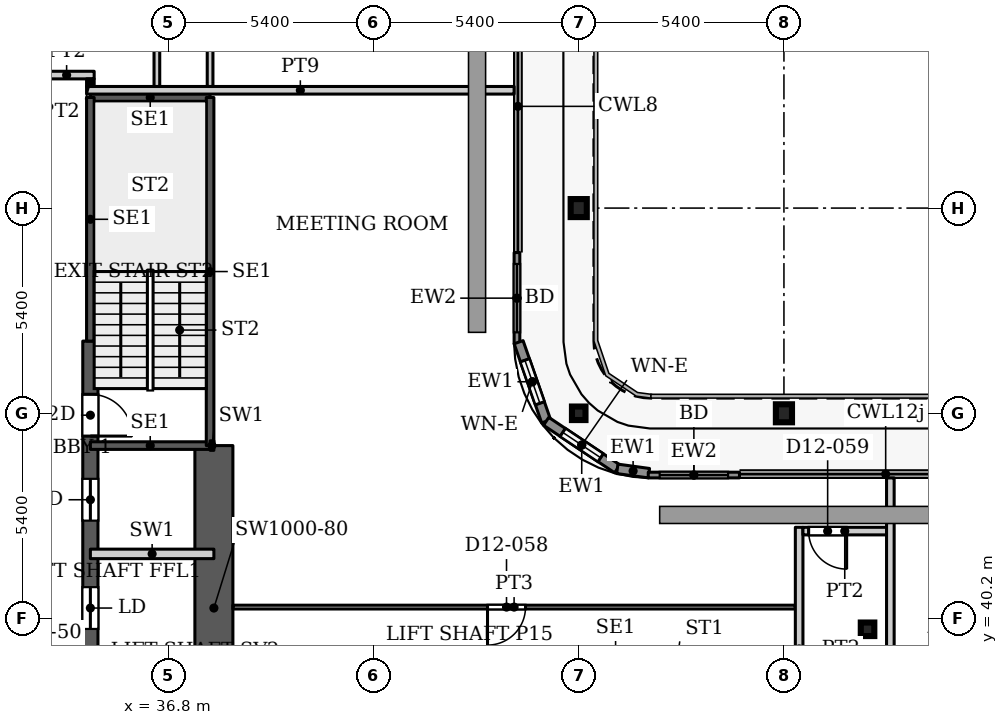
"""IFC4 building model, lengths in metres.
Left out: names, types, materials, properties, quantities, classifications, styles, units other than length and angle.
Written with IfcOpenShell. Run it as: python <this file> out.ifc"""

import sys

from ifc_helpers import new_model, si_unit, direction, frame, frame_2d, origin, origin_2d, place, context, subcontext, project, spatial, rectangle, hollow_rectangle, i_section, extrude, source, transform, mapped, element, fill, save


model = new_model("IFC4")
c1 = context("Model", 3, precision=1e-05, world=origin(), true_north=direction((0.0, 1.0)))
c2 = subcontext(c1, "Body", "Model", "MODEL_VIEW")
j1 = project(units=[si_unit("LENGTHUNIT", "METRE"), si_unit("PLANEANGLEUNIT", "RADIAN")], contexts=[c1])
p1 = place(None, origin())
s1 = spatial("IfcSite", under=j1, at=p1, CompositionType="ELEMENT")
p2 = place(p1, origin())
s2 = spatial("IfcBuilding", under=s1, at=p2, CompositionType="ELEMENT")
p3 = place(p2, frame((0.0, 0.0, 57.8)))
s3 = spatial("IfcBuildingStorey", under=s2, at=p3, CompositionType="ELEMENT", Elevation=57.8)
for number, where, z_axis, x_axis in (
    (1, (53.0, 45.6, 0.0), (0.0, 0.0, 1.0), (1.0, 0.0, 0.0)),
    (2, (47.6, 51.0, 0.0), (0.0, 0.0, 1.0), (1.0, 0.0, 0.0)),
):
    element("IfcColumn", number, at=place(p3, frame(where, z_axis=z_axis, x_axis=x_axis)), inside=s3, PredefinedType="COLUMN", context=c2, shape_type="SweptSolid", body=[
        extrude(i_section(OverallWidth=0.424, OverallDepth=0.474, WebThickness=0.048, FlangeThickness=0.077, FilletRadius=0.014, at=origin_2d()), origin(), (0.0, 0.0, 1.0), 3.9),
    ])
for number, where, z_axis, x_axis in (
    (3, (55.2, 39.916, 0.0), (0.0, 0.0, 1.0), (1.0, 0.0, 0.0)),
    (4, (47.6, 45.6, 0.0), (0.0, 0.0, 1.0), (1.0, 0.0, 0.0)),
):
    element("IfcColumn", number, at=place(p3, frame(where, z_axis=z_axis, x_axis=x_axis)), inside=s3, PredefinedType="COLUMN", context=c2, shape_type="SweptSolid", body=[
        extrude(hollow_rectangle(XDim=0.356, YDim=0.356, WallThickness=0.016, InnerFilletRadius=0.016, OuterFilletRadius=0.032, at=origin_2d()), origin(), (0.0, 0.0, 1.0), 3.9),
    ])
p4 = place(p3, frame((34.75, 29.05, 0.0), z_axis=(0.0, 0.0, 1.0), x_axis=(0.0, 1.0, 0.0)))
e5 = element("IfcWall", 5, at=p4, inside=s3, PredefinedType="SHEAR", context=c2, shape_type="SweptSolid", body=[
    extrude(rectangle(XDim=18.45, YDim=0.4, at=frame_2d((9.225, 0.0))), origin(), (0.0, 0.0, 1.0), 3.9),
])
p5 = place(p4, frame((8.025, 0.0, 0.0)))
e6 = element("IfcOpeningElement", 6, at=p5, cuts=e5, PredefinedType="OPENING", context=c2, shape_type="SweptSolid", body=[
    extrude(rectangle(XDim=1.1, YDim=2.2, at=frame_2d((0.55, 1.1))), frame((0.0, 0.21, 0.0), z_axis=(0.0, -1.0, 0.0), x_axis=(1.0, 0.0, 0.0)), (0.0, 0.0, 1.0), 0.42),
])
p6 = place(p4, frame((10.875, 0.0, 0.0)))
e7 = element("IfcOpeningElement", 7, at=p6, cuts=e5, PredefinedType="OPENING", context=c2, shape_type="SweptSolid", body=[
    extrude(rectangle(XDim=1.1, YDim=2.2, at=frame_2d((0.55, 1.1))), frame((0.0, 0.21, 0.0), z_axis=(0.0, -1.0, 0.0), x_axis=(1.0, 0.0, 0.0)), (0.0, 0.0, 1.0), 0.42),
])
p7 = place(p4, frame((13.725, 0.0, 0.0)))
e8 = element("IfcOpeningElement", 8, at=p7, cuts=e5, PredefinedType="OPENING", context=c2, shape_type="SweptSolid", body=[
    extrude(rectangle(XDim=1.1, YDim=2.2, at=frame_2d((0.55, 1.1))), frame((0.0, 0.21, 0.0), z_axis=(0.0, -1.0, 0.0), x_axis=(1.0, 0.0, 0.0)), (0.0, 0.0, 1.0), 0.42),
])
p8 = place(p4, frame((15.95, 0.0, 0.0)))
e9 = element("IfcOpeningElement", 9, at=p8, cuts=e5, PredefinedType="OPENING", context=c2, shape_type="SweptSolid", body=[
    extrude(rectangle(XDim=1.1, YDim=2.2, at=frame_2d((0.55, 1.1))), frame((0.0, 0.21, 0.0), z_axis=(0.0, -1.0, 0.0), x_axis=(1.0, 0.0, 0.0)), (0.0, 0.0, 1.0), 0.42),
])
p9 = place(p3, frame((38.0, 36.2, 0.0), z_axis=(0.0, 0.0, 1.0), x_axis=(0.0, 1.0, 0.0)))
e10 = element("IfcWall", 10, at=p9, inside=s3, PredefinedType="SHEAR", context=c2, shape_type="SweptSolid", body=[
    extrude(rectangle(XDim=8.55, YDim=1.0, at=frame_2d((4.275, 0.0))), origin(), (0.0, 0.0, 1.0), 3.9),
])
p10 = place(p3, frame((45.975, 49.83, 0.0), z_axis=(0.0, 0.0, 1.0), x_axis=(0.0, -1.0, 0.0)))
e11 = element("IfcWall", 11, at=p10, inside=s3, PredefinedType="SOLIDWALL", context=c2, shape_type="SweptSolid", body=[
    extrude(rectangle(XDim=2.4, YDim=0.15, at=frame_2d((1.2, 0.0))), origin(), (0.0, 0.0, 1.0), 3.75),
])
p11 = place(p10, frame((0.3, 0.0, 0.0)))
e12 = element("IfcOpeningElement", 12, at=p11, cuts=e11, PredefinedType="OPENING", context=c2, shape_type="SweptSolid", body=[
    extrude(rectangle(XDim=1.8, YDim=2.4, at=frame_2d((0.9, 1.2))), frame((0.0, 0.085, 0.0), z_axis=(0.0, -1.0, 0.0), x_axis=(1.0, 0.0, 0.0)), (0.0, 0.0, 1.0), 0.17),
])
p12 = place(p3, frame((46.018, 47.471, 0.0), z_axis=(0.0, 0.0, 1.0), x_axis=(0.328791208903, -0.944402637093, 0.0)))
e13 = element("IfcWall", 13, at=p12, inside=s3, PredefinedType="SOLIDWALL", context=c2, shape_type="SweptSolid", body=[
    extrude(rectangle(XDim=2.205, YDim=0.25, at=frame_2d((1.102, 0.0))), origin(), (0.0, 0.0, 1.0), 3.75),
])
p13 = place(p12, frame((0.503, 0.0, 0.6)))
e14 = element("IfcOpeningElement", 14, at=p13, cuts=e13, PredefinedType="OPENING", context=c2, shape_type="SweptSolid", body=[
    extrude(rectangle(XDim=1.2, YDim=2.1, at=frame_2d((0.6, 1.05))), frame((0.0, 0.135, 0.0), z_axis=(0.0, -1.0, 0.0), x_axis=(1.0, 0.0, 0.0)), (0.0, 0.0, 1.0), 0.27),
])
p14 = place(p3, frame((46.743, 45.389, 0.0), z_axis=(0.0, 0.0, 1.0), x_axis=(0.831449265529, -0.555600682912, 0.0)))
e15 = element("IfcWall", 15, at=p14, inside=s3, PredefinedType="SOLIDWALL", context=c2, shape_type="SweptSolid", body=[
    extrude(rectangle(XDim=2.251, YDim=0.25, at=frame_2d((1.126, 0.0))), origin(), (0.0, 0.0, 1.0), 3.75),
])
p15 = place(p14, frame((0.525, 0.0, 0.6)))
e16 = element("IfcOpeningElement", 16, at=p15, cuts=e15, PredefinedType="OPENING", context=c2, shape_type="SweptSolid", body=[
    extrude(rectangle(XDim=1.2, YDim=2.1, at=frame_2d((0.6, 1.05))), frame((0.0, 0.135, 0.0), z_axis=(0.0, -1.0, 0.0), x_axis=(1.0, 0.0, 0.0)), (0.0, 0.0, 1.0), 0.27),
])
p16 = place(p3, frame((48.615, 44.138, 0.0), z_axis=(0.0, 0.0, 1.0), x_axis=(0.990741504246, -0.135761819977, 0.0)))
e17 = element("IfcWall", 17, at=p16, inside=s3, PredefinedType="SOLIDWALL", context=c2, shape_type="SweptSolid", body=[
    extrude(rectangle(XDim=0.84, YDim=0.25, at=frame_2d((0.42, 0.0))), origin(), (0.0, 0.0, 1.0), 3.75),
])
p17 = place(p3, frame((49.43, 43.975, 0.0), z_axis=(0.0, 0.0, 1.0), x_axis=(1.0, 0.0, 0.0)))
e18 = element("IfcWall", 18, at=p17, inside=s3, PredefinedType="SOLIDWALL", context=c2, shape_type="SweptSolid", body=[
    extrude(rectangle(XDim=2.4, YDim=0.15, at=frame_2d((1.2, 0.0))), origin(), (0.0, 0.0, 1.0), 3.75),
])
p18 = place(p17, frame((0.3, 0.0, 0.0)))
e19 = element("IfcOpeningElement", 19, at=p18, cuts=e18, PredefinedType="OPENING", context=c2, shape_type="SweptSolid", body=[
    extrude(rectangle(XDim=1.8, YDim=2.4, at=frame_2d((0.9, 1.2))), frame((0.0, 0.085, 0.0), z_axis=(0.0, -1.0, 0.0), x_axis=(1.0, 0.0, 0.0)), (0.0, 0.0, 1.0), 0.17),
])
for number, where, z_axis, x_axis in (
    (20, (34.75, 44.75, 0.0), (0.0, 0.0, 1.0), (1.0, 0.0, 0.0)),
    (21, (34.75, 53.91, 0.0), (0.0, 0.0, 1.0), (1.0, 0.0, 0.0)),
):
    element("IfcWall", number, at=place(p3, frame(where, z_axis=z_axis, x_axis=x_axis)), inside=s3, PredefinedType="SHEAR", context=c2, shape_type="SweptSolid", body=[
        extrude(rectangle(XDim=3.15, YDim=0.2, at=frame_2d((1.575, 0.0))), origin(), (0.0, 0.0, 1.0), 3.9),
    ])
p19 = place(p3, frame((34.75, 47.5, 0.0), z_axis=(0.0, 0.0, 1.0), x_axis=(0.0, 1.0, 0.0)))
e22 = element("IfcWall", 22, at=p19, inside=s3, PredefinedType="SHEAR", context=c2, shape_type="SweptSolid", body=[
    extrude(rectangle(XDim=6.41, YDim=0.2, at=frame_2d((3.205, 0.0))), origin(), (0.0, 0.0, 1.0), 3.9),
])
p20 = place(p3, frame((37.9, 44.75, 0.0), z_axis=(0.0, 0.0, 1.0), x_axis=(0.0, 1.0, 0.0)))
e23 = element("IfcWall", 23, at=p20, inside=s3, PredefinedType="SHEAR", context=c2, shape_type="SweptSolid", body=[
    extrude(rectangle(XDim=9.16, YDim=0.2, at=frame_2d((4.58, 0.0))), origin(), (0.0, 0.0, 1.0), 3.9),
])
p21 = place(p3, frame((34.75, 41.9, 0.0), z_axis=(0.0, 0.0, 1.0), x_axis=(1.0, 0.0, 0.0)))
e24 = element("IfcWall", 24, at=p21, inside=s3, PredefinedType="PARTITIONING", context=c2, shape_type="SweptSolid", body=[
    extrude(rectangle(XDim=3.25, YDim=0.25, at=frame_2d((1.625, 0.0))), origin(), (0.0, 0.0, 1.0), 3.9),
])
p22 = place(p3, frame((37.9, 44.75, 0.0), z_axis=(0.0, 0.0, 1.0), x_axis=(1.0, 0.0, 0.0)))
e25 = element("IfcWall", 25, at=p22, inside=s3, PredefinedType="PARTITIONING", context=c2, shape_type="SweptSolid", body=[
    extrude(rectangle(XDim=0.1, YDim=0.25, at=frame_2d((0.05, 0.0))), origin(), (0.0, 0.0, 1.0), 3.9),
])
p23 = place(p3, frame((33.4, 54.5, 0.0), z_axis=(0.0, 0.0, 1.0), x_axis=(1.0, 0.0, 0.0)))
e26 = element("IfcWall", 26, at=p23, inside=s3, PredefinedType="PARTITIONING", context=c2, shape_type="SweptSolid", body=[
    extrude(rectangle(XDim=1.45, YDim=0.2, at=frame_2d((0.725, 0.0))), origin(), (0.0, 0.0, 1.0), 3.6),
])
p24 = place(p3, frame((34.65, 54.1, 0.0), z_axis=(0.0, 0.0, 1.0), x_axis=(1.0, 0.0, 0.0)))
e27 = element("IfcWall", 27, at=p24, inside=s3, PredefinedType="PARTITIONING", context=c2, shape_type="SweptSolid", body=[
    extrude(rectangle(XDim=11.25, YDim=0.2, at=frame_2d((5.625, 0.0))), origin(), (0.0, 0.0, 1.0), 3.6),
])
p25 = place(p3, frame((34.75, 54.2, 0.0), z_axis=(0.0, 0.0, 1.0), x_axis=(0.0, 1.0, 0.0)))
e28 = element("IfcWall", 28, at=p25, inside=s3, PredefinedType="PARTITIONING", context=c2, shape_type="SweptSolid", body=[
    extrude(rectangle(XDim=0.2, YDim=0.2, at=frame_2d((0.1, 0.0))), origin(), (0.0, 0.0, 1.0), 3.6),
])
p26 = place(p3, frame((36.5, 54.2, 0.0), z_axis=(0.0, 0.0, 1.0), x_axis=(0.0, 1.0, 0.0)))
e29 = element("IfcWall", 29, at=p26, inside=s3, PredefinedType="PARTITIONING", context=c2, shape_type="SweptSolid", body=[
    extrude(rectangle(XDim=10.175, YDim=0.15, at=frame_2d((5.087, 0.0))), origin(), (0.0, 0.0, 1.0), 3.6),
])
p27 = place(p26, frame((5.8, 0.0, 0.0)))
e30 = element("IfcOpeningElement", 30, at=p27, cuts=e29, PredefinedType="OPENING", context=c2, shape_type="SweptSolid", body=[
    extrude(rectangle(XDim=0.8, YDim=2.1, at=frame_2d((0.4, 1.05))), frame((0.0, 0.085, 0.0), z_axis=(0.0, -1.0, 0.0), x_axis=(1.0, 0.0, 0.0)), (0.0, 0.0, 1.0), 0.17),
])
p28 = place(p26, frame((1.45, 0.0, 0.0)))
e31 = element("IfcOpeningElement", 31, at=p28, cuts=e29, PredefinedType="OPENING", context=c2, shape_type="SweptSolid", body=[
    extrude(rectangle(XDim=0.9, YDim=2.1, at=frame_2d((0.45, 1.05))), frame((0.0, 0.085, 0.0), z_axis=(0.0, -1.0, 0.0), x_axis=(1.0, 0.0, 0.0)), (0.0, 0.0, 1.0), 0.17),
])
p29 = place(p26, frame((8.5, 0.0, 0.0)))
e32 = element("IfcOpeningElement", 32, at=p29, cuts=e29, PredefinedType="OPENING", context=c2, shape_type="SweptSolid", body=[
    extrude(rectangle(XDim=0.8, YDim=2.1, at=frame_2d((0.4, 1.05))), frame((0.0, 0.085, 0.0), z_axis=(0.0, -1.0, 0.0), x_axis=(1.0, 0.0, 0.0)), (0.0, 0.0, 1.0), 0.17),
])
p30 = place(p3, frame((37.9, 54.2, 0.0), z_axis=(0.0, 0.0, 1.0), x_axis=(0.0, 1.0, 0.0)))
e33 = element("IfcWall", 33, at=p30, inside=s3, PredefinedType="PARTITIONING", context=c2, shape_type="SweptSolid", body=[
    extrude(rectangle(XDim=13.3, YDim=0.15, at=frame_2d((6.65, 0.0))), origin(), (0.0, 0.0, 1.0), 3.6),
])
p31 = place(p30, frame((1.25, 0.0, 0.0)))
e34 = element("IfcOpeningElement", 34, at=p31, cuts=e33, PredefinedType="OPENING", context=c2, shape_type="SweptSolid", body=[
    extrude(rectangle(XDim=0.9, YDim=2.1, at=frame_2d((0.45, 1.05))), frame((0.0, 0.085, 0.0), z_axis=(0.0, -1.0, 0.0), x_axis=(1.0, 0.0, 0.0)), (0.0, 0.0, 1.0), 0.17),
])
p32 = place(p30, frame((10.2, 0.0, 0.0)))
e35 = element("IfcOpeningElement", 35, at=p32, cuts=e33, PredefinedType="OPENING", context=c2, shape_type="SweptSolid", body=[
    extrude(rectangle(XDim=1.0, YDim=2.1, at=frame_2d((0.5, 1.05))), frame((0.0, 0.085, 0.0), z_axis=(0.0, -1.0, 0.0), x_axis=(1.0, 0.0, 0.0)), (0.0, 0.0, 1.0), 0.17),
])
p33 = place(p30, frame((4.25, 0.0, 0.0)))
e36 = element("IfcOpeningElement", 36, at=p33, cuts=e33, PredefinedType="OPENING", context=c2, shape_type="SweptSolid", body=[
    extrude(rectangle(XDim=0.9, YDim=2.1, at=frame_2d((0.45, 1.05))), frame((0.0, 0.085, 0.0), z_axis=(0.0, -1.0, 0.0), x_axis=(1.0, 0.0, 0.0)), (0.0, 0.0, 1.0), 0.17),
])
p34 = place(p3, frame((38.499, 40.5, 0.0), z_axis=(0.0, 0.0, 1.0), x_axis=(1.0, 0.0, 0.0)))
e37 = element("IfcWall", 37, at=p34, inside=s3, PredefinedType="PARTITIONING", context=c2, shape_type="SweptSolid", body=[
    extrude(rectangle(XDim=14.801, YDim=0.1, at=frame_2d((7.4, 0.0))), origin(), (0.0, 0.0, 1.0), 3.6),
])
p35 = place(p34, frame((6.701, 0.0, 0.0)))
e38 = element("IfcOpeningElement", 38, at=p35, cuts=e37, PredefinedType="OPENING", context=c2, shape_type="SweptSolid", body=[
    extrude(rectangle(XDim=1.0, YDim=2.1, at=frame_2d((0.5, 1.05))), frame((0.0, 0.06, 0.0), z_axis=(0.0, -1.0, 0.0), x_axis=(1.0, 0.0, 0.0)), (0.0, 0.0, 1.0), 0.12),
])
p36 = place(p3, frame((53.4, 36.199, 0.0), z_axis=(0.0, 0.0, 1.0), x_axis=(0.0, 1.0, 0.0)))
e39 = element("IfcWall", 39, at=p36, inside=s3, PredefinedType="PARTITIONING", context=c2, shape_type="SweptSolid", body=[
    extrude(rectangle(XDim=6.401, YDim=0.2, at=frame_2d((3.201, 0.0))), origin(), (0.0, 0.0, 1.0), 3.6),
])
p37 = place(p3, frame((53.5, 42.5, 0.0), z_axis=(0.0, 0.0, 1.0), x_axis=(1.0, 0.0, 0.0)))
e40 = element("IfcWall", 40, at=p37, inside=s3, PredefinedType="PARTITIONING", context=c2, shape_type="SweptSolid", body=[
    extrude(rectangle(XDim=2.2, YDim=0.2, at=frame_2d((1.1, 0.0))), origin(), (0.0, 0.0, 1.0), 3.6),
])
p38 = place(p37, frame((0.15, 0.0, 0.0)))
e41 = element("IfcOpeningElement", 41, at=p38, cuts=e40, PredefinedType="OPENING", context=c2, shape_type="SweptSolid", body=[
    extrude(rectangle(XDim=1.0, YDim=2.1, at=frame_2d((0.5, 1.05))), frame((0.0, 0.11, 0.0), z_axis=(0.0, -1.0, 0.0), x_axis=(1.0, 0.0, 0.0)), (0.0, 0.0, 1.0), 0.22),
])
p39 = place(p3, frame((55.8, 30.4, 0.0), z_axis=(0.0, 0.0, 1.0), x_axis=(0.0, 1.0, 0.0)))
e42 = element("IfcWall", 42, at=p39, inside=s3, PredefinedType="PARTITIONING", context=c2, shape_type="SweptSolid", body=[
    extrude(rectangle(XDim=13.5, YDim=0.2, at=frame_2d((6.75, 0.0))), origin(), (0.0, 0.0, 1.0), 3.6),
])
m1 = source(origin(), c2, "Body", "SweptSolid", [
    extrude(rectangle(XDim=1.8, YDim=2.4, at=frame_2d((0.9, 1.2))), frame((0.0, 0.025, 0.0), z_axis=(0.0, -1.0, 0.0), x_axis=(1.0, 0.0, 0.0)), (0.0, 0.0, 1.0), 0.05),
])
p40 = place(p11, origin())
e43 = element("IfcDoor", 43, at=p40, inside=s3, OperationType="SLIDING_TO_LEFT", PredefinedType="DOOR", context=c2, shape_type="MappedRepresentation", body=[
    mapped(m1, transform((0.0, 0.0, 0.0), x_axis=(1.0, 0.0, 0.0), y_axis=(0.0, 1.0, 0.0), z_axis=(0.0, 0.0, 1.0), scale=1.0)),
])
fill(e12, e43)
m2 = source(origin(), c2, "Body", "SweptSolid", [
    extrude(rectangle(XDim=1.2, YDim=2.1, at=frame_2d((0.6, 1.05))), frame((0.0, 0.03, 0.0), z_axis=(0.0, -1.0, 0.0), x_axis=(1.0, 0.0, 0.0)), (0.0, 0.0, 1.0), 0.06),
])
p41 = place(p13, origin())
e44 = element("IfcWindow", 44, at=p41, inside=s3, PartitioningType="SINGLE_PANEL", PredefinedType="WINDOW", context=c2, shape_type="MappedRepresentation", body=[
    mapped(m2, transform((0.0, 0.0, 0.0), x_axis=(1.0, 0.0, 0.0), y_axis=(0.0, 1.0, 0.0), z_axis=(0.0, 0.0, 1.0), scale=1.0)),
])
fill(e14, e44)
p42 = place(p15, origin())
e45 = element("IfcWindow", 45, at=p42, inside=s3, PartitioningType="SINGLE_PANEL", PredefinedType="WINDOW", context=c2, shape_type="MappedRepresentation", body=[
    mapped(m2, transform((0.0, 0.0, 0.0), x_axis=(1.0, 0.0, 0.0), y_axis=(0.0, 1.0, 0.0), z_axis=(0.0, 0.0, 1.0), scale=1.0)),
])
fill(e16, e45)
p43 = place(p18, origin())
e46 = element("IfcDoor", 46, at=p43, inside=s3, OperationType="SLIDING_TO_LEFT", PredefinedType="DOOR", context=c2, shape_type="MappedRepresentation", body=[
    mapped(m1, transform((0.0, 0.0, 0.0), x_axis=(1.0, 0.0, 0.0), y_axis=(0.0, 1.0, 0.0), z_axis=(0.0, 0.0, 1.0), scale=1.0)),
])
fill(e19, e46)
m3 = source(origin(), c2, "Body", "SweptSolid", [
    extrude(rectangle(XDim=1.1, YDim=2.2, at=frame_2d((0.55, 1.1))), frame((0.0, 0.025, 0.0), z_axis=(0.0, -1.0, 0.0), x_axis=(1.0, 0.0, 0.0)), (0.0, 0.0, 1.0), 0.05),
])
p44 = place(p6, origin())
e47 = element("IfcDoor", 47, at=p44, inside=s3, OperationType="SLIDING_TO_LEFT", PredefinedType="DOOR", context=c2, shape_type="MappedRepresentation", body=[
    mapped(m3, transform((0.0, 0.0, 0.0), x_axis=(1.0, 0.0, 0.0), y_axis=(0.0, 1.0, 0.0), z_axis=(0.0, 0.0, 1.0), scale=1.0)),
])
fill(e7, e47)
p45 = place(p7, origin())
e48 = element("IfcDoor", 48, at=p45, inside=s3, OperationType="SLIDING_TO_LEFT", PredefinedType="DOOR", context=c2, shape_type="MappedRepresentation", body=[
    mapped(m3, transform((0.0, 0.0, 0.0), x_axis=(1.0, 0.0, 0.0), y_axis=(0.0, 1.0, 0.0), z_axis=(0.0, 0.0, 1.0), scale=1.0)),
])
fill(e8, e48)
m4 = source(origin(), c2, "Body", "SweptSolid", [
    extrude(rectangle(XDim=1.1, YDim=2.2, at=frame_2d((0.55, 1.1))), frame((0.0, 0.025, 0.0), z_axis=(0.0, -1.0, 0.0), x_axis=(1.0, 0.0, 0.0)), (0.0, 0.0, 1.0), 0.05),
])
p46 = place(p8, origin())
e49 = element("IfcDoor", 49, at=p46, inside=s3, OperationType="SINGLE_SWING_RIGHT", PredefinedType="DOOR", context=c2, shape_type="MappedRepresentation", body=[
    mapped(m4, transform((0.0, 0.0, 0.0), x_axis=(1.0, 0.0, 0.0), y_axis=(0.0, 1.0, 0.0), z_axis=(0.0, 0.0, 1.0), scale=1.0)),
])
fill(e9, e49)
m5 = source(origin(), c2, "Body", "SweptSolid", [
    extrude(rectangle(XDim=1.0, YDim=2.1, at=frame_2d((0.5, 1.05))), frame((0.0, 0.025, 0.0), z_axis=(0.0, -1.0, 0.0), x_axis=(1.0, 0.0, 0.0)), (0.0, 0.0, 1.0), 0.05),
])
p47 = place(p35, origin())
e50 = element("IfcDoor", 50, at=p47, inside=s3, OperationType="SINGLE_SWING_RIGHT", PredefinedType="DOOR", context=c2, shape_type="MappedRepresentation", body=[
    mapped(m5, transform((0.0, 0.0, 0.0), x_axis=(1.0, 0.0, 0.0), y_axis=(0.0, 1.0, 0.0), z_axis=(0.0, 0.0, 1.0), scale=1.0)),
])
fill(e38, e50)
m6 = source(origin(), c2, "Body", "SweptSolid", [
    extrude(rectangle(XDim=1.0, YDim=2.1, at=frame_2d((0.5, 1.05))), frame((0.0, 0.025, 0.0), z_axis=(0.0, -1.0, 0.0), x_axis=(1.0, 0.0, 0.0)), (0.0, 0.0, 1.0), 0.05),
])
p48 = place(p38, origin())
e51 = element("IfcDoor", 51, at=p48, inside=s3, OperationType="SINGLE_SWING_RIGHT", PredefinedType="DOOR", context=c2, shape_type="MappedRepresentation", body=[
    mapped(m6, transform((0.0, 0.0, 0.0), x_axis=(1.0, 0.0, 0.0), y_axis=(0.0, 1.0, 0.0), z_axis=(0.0, 0.0, 1.0), scale=1.0)),
])
fill(e41, e51)
save(model, sys.argv[1])
